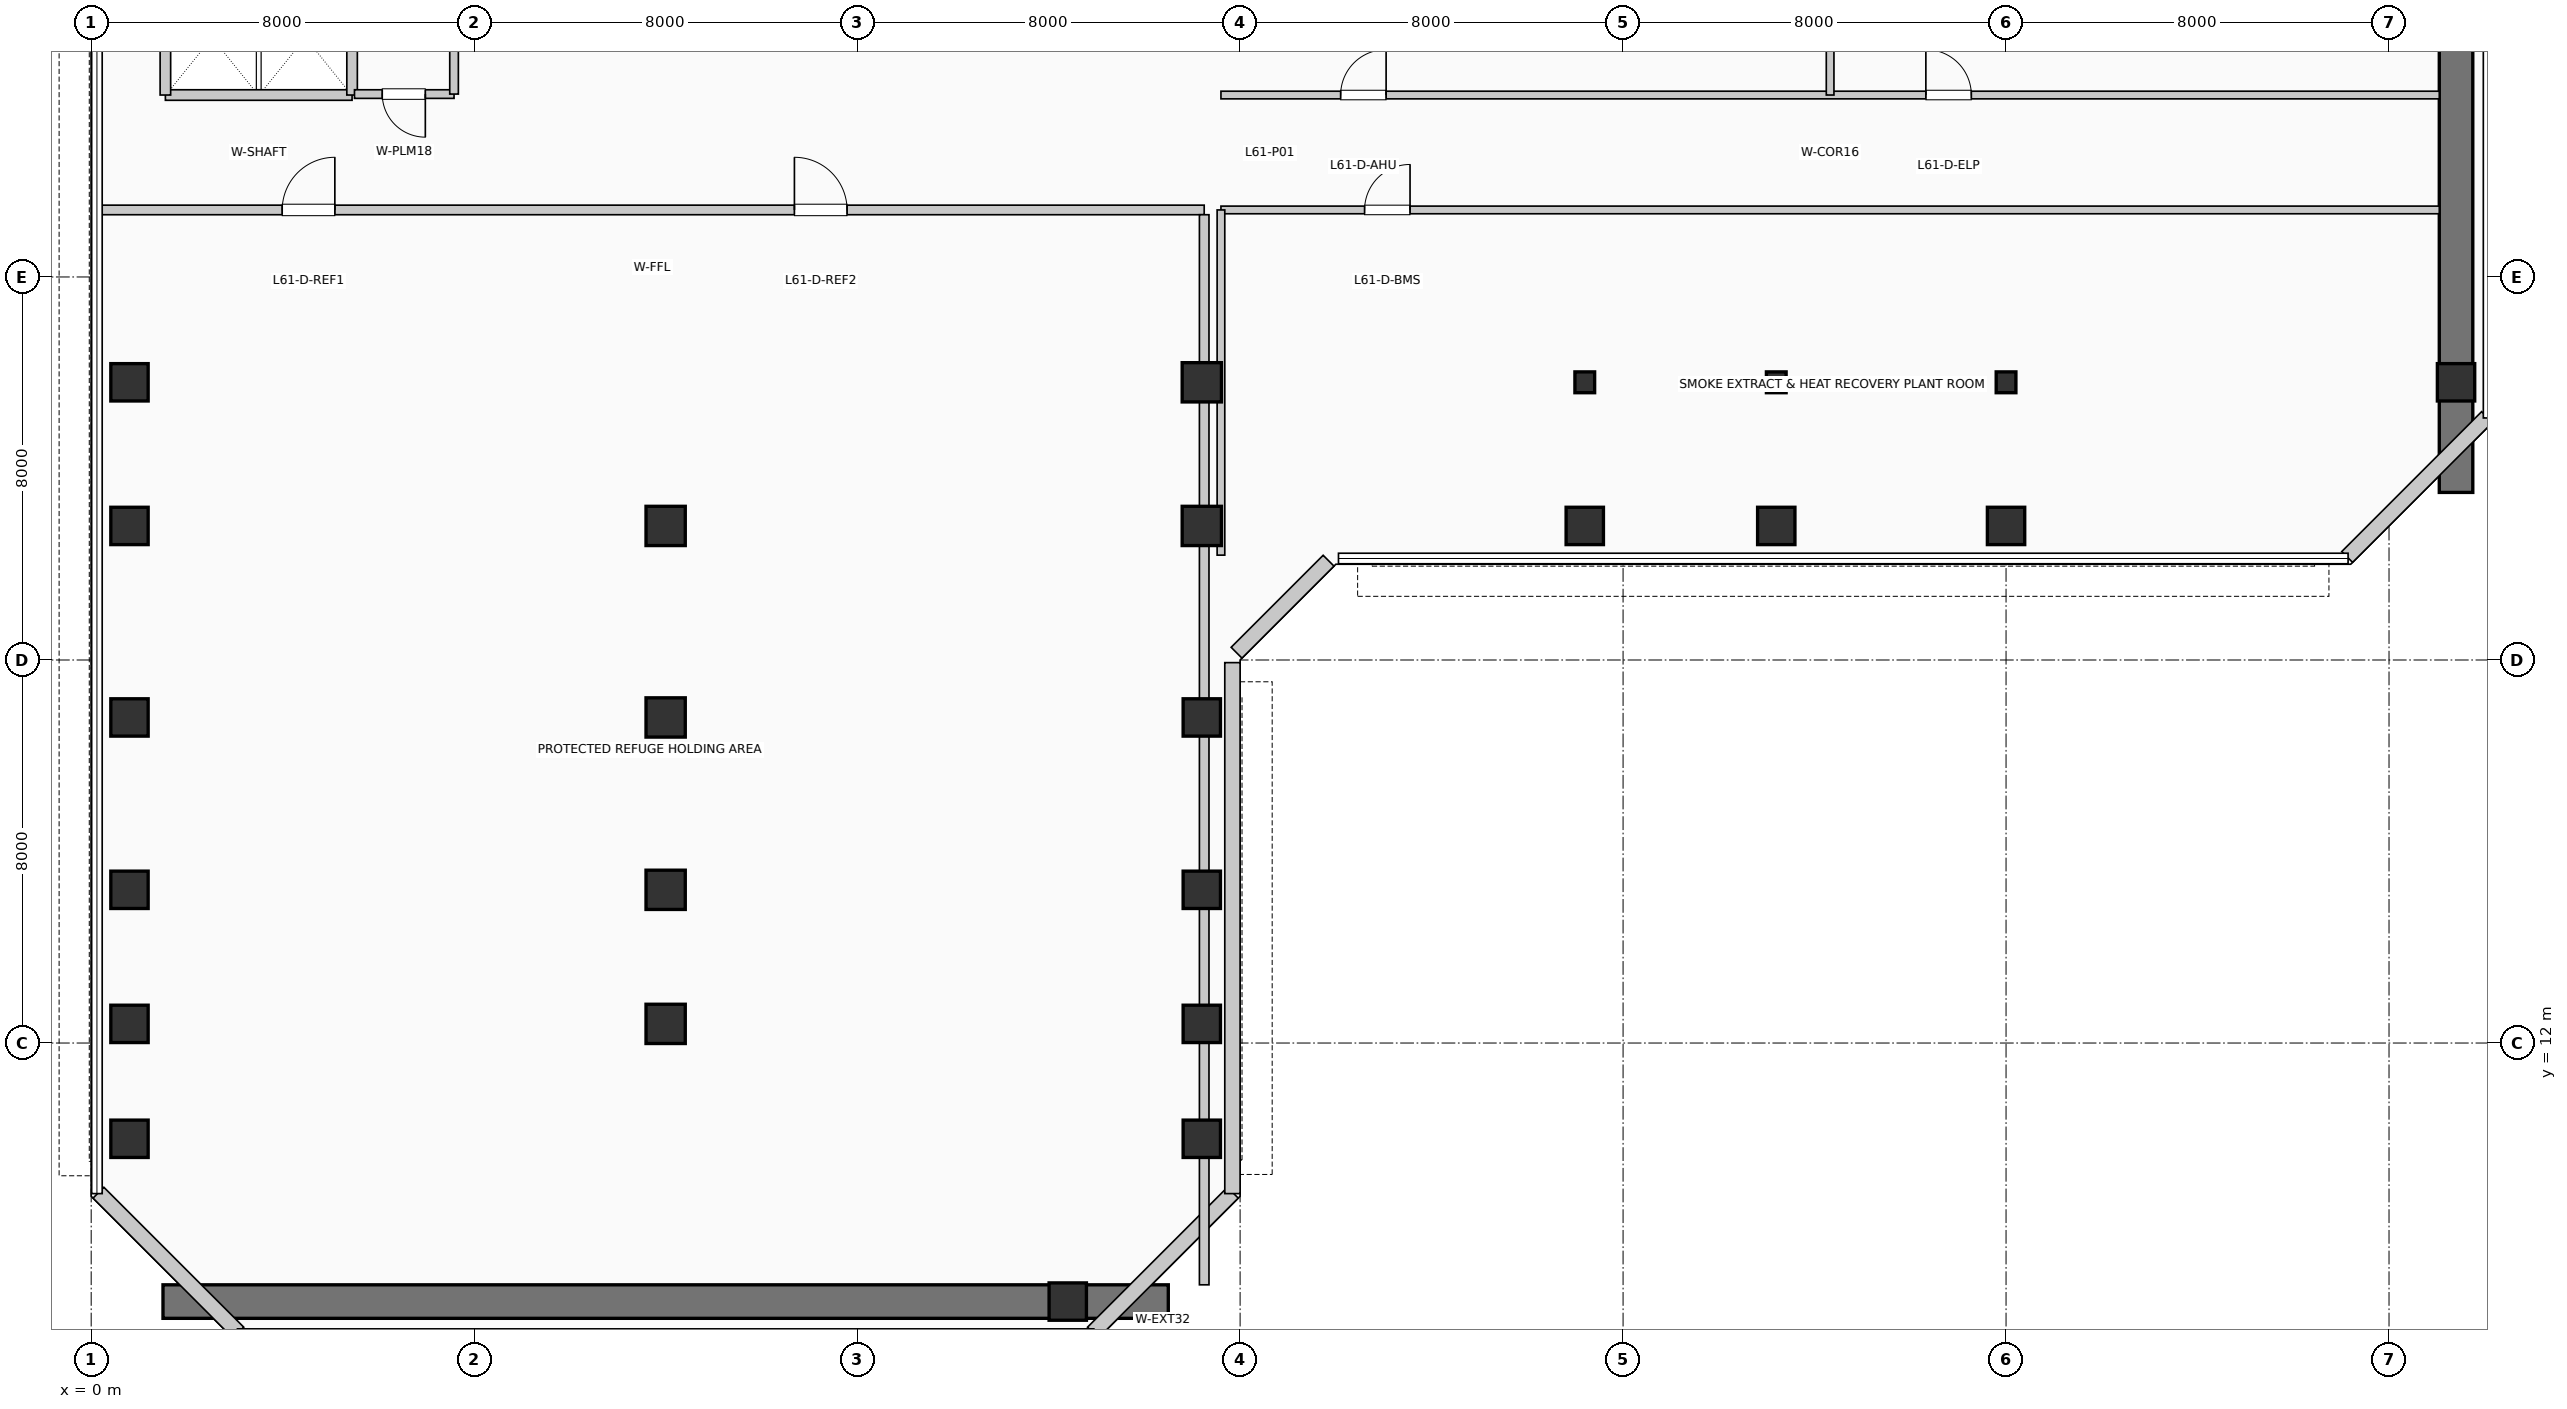
"""IFC4 building model, lengths in metres.
Left out: names, types, materials, properties, quantities, classifications, styles, units other than length and angle.
Written with IfcOpenShell. Run it as: python <this file> out.ifc"""

import sys

from ifc_helpers import new_model, si_unit, direction, frame, frame_2d, origin, origin_2d, place, context, subcontext, project, spatial, rectangle, i_section, extrude, element, fill, save


model = new_model("IFC4")
c1 = context("Model", 3, precision=1e-05, world=origin(), true_north=direction((0.0, 1.0)))
c2 = subcontext(c1, "Body", "Model", "MODEL_VIEW")
j1 = project(units=[si_unit("LENGTHUNIT", "METRE"), si_unit("PLANEANGLEUNIT", "RADIAN")], contexts=[c1])
p1 = place(None, origin())
s1 = spatial("IfcSite", under=j1, at=p1, CompositionType="ELEMENT")
p2 = place(p1, origin())
s2 = spatial("IfcBuilding", under=s1, at=p2, CompositionType="ELEMENT")
p3 = place(p2, frame((0.0, 0.0, 251.46)))
s3 = spatial("IfcBuildingStorey", under=s2, at=p3, CompositionType="ELEMENT", Elevation=251.46)
p4 = place(p3, frame((1.5, 6.6, 0.0), z_axis=(0.0, 0.0, 1.0), x_axis=(1.0, 0.0, 0.0)))
e1 = element("IfcWall", 1, at=p4, inside=s3, PredefinedType="SHEAR", context=c2, shape_type="SweptSolid", body=[
    extrude(rectangle(XDim=21.0, YDim=0.7, at=frame_2d((10.5, 0.0))), origin(), (0.0, 0.0, 1.0), 4.3),
])
p5 = place(p3, frame((49.4, 23.5, 0.0), z_axis=(0.0, 0.0, 1.0), x_axis=(0.0, 1.0, 0.0)))
e2 = element("IfcWall", 2, at=p5, inside=s3, PredefinedType="SHEAR", context=c2, shape_type="SweptSolid", body=[
    extrude(rectangle(XDim=20.9, YDim=0.7, at=frame_2d((10.45, 0.0))), origin(), (0.0, 0.0, 1.0), 4.3),
])
for number, where, z_axis, x_axis in (
    (3, (0.8, 10.0, 0.0), (0.0, 0.0, 1.0), (1.0, 0.0, 0.0)),
    (4, (0.8, 12.4, 0.0), (0.0, 0.0, 1.0), (1.0, 0.0, 0.0)),
    (5, (0.8, 15.2, 0.0), (0.0, 0.0, 1.0), (1.0, 0.0, 0.0)),
    (6, (0.8, 18.8, 0.0), (0.0, 0.0, 1.0), (1.0, 0.0, 0.0)),
    (7, (0.8, 22.8, 0.0), (0.0, 0.0, 1.0), (1.0, 0.0, 0.0)),
    (8, (0.8, 25.8, 0.0), (0.0, 0.0, 1.0), (1.0, 0.0, 0.0)),
):
    element("IfcColumn", number, at=place(p3, frame(where, z_axis=z_axis, x_axis=x_axis)), inside=s3, PredefinedType="COLUMN", context=c2, shape_type="SweptSolid", body=[
        extrude(rectangle(XDim=0.78, YDim=0.78, at=origin_2d()), origin(), (0.0, 0.0, 1.0), 4.95),
    ])
for number, where, z_axis, x_axis in (
    (9, (12.0, 12.4, 0.0), (0.0, 0.0, 1.0), (1.0, 0.0, 0.0)),
    (10, (12.0, 15.2, 0.0), (0.0, 0.0, 1.0), (1.0, 0.0, 0.0)),
    (11, (12.0, 18.8, 0.0), (0.0, 0.0, 1.0), (1.0, 0.0, 0.0)),
    (12, (12.0, 22.8, 0.0), (0.0, 0.0, 1.0), (1.0, 0.0, 0.0)),
):
    element("IfcColumn", number, at=place(p3, frame(where, z_axis=z_axis, x_axis=x_axis)), inside=s3, PredefinedType="COLUMN", context=c2, shape_type="SweptSolid", body=[
        extrude(rectangle(XDim=0.82, YDim=0.82, at=origin_2d()), origin(), (0.0, 0.0, 1.0), 4.95),
    ])
for number, where, z_axis, x_axis in (
    (13, (20.4, 6.6, 0.0), (0.0, 0.0, 1.0), (1.0, 0.0, 0.0)),
    (14, (23.2, 10.0, 0.0), (0.0, 0.0, 1.0), (1.0, 0.0, 0.0)),
    (15, (23.2, 12.4, 0.0), (0.0, 0.0, 1.0), (1.0, 0.0, 0.0)),
    (16, (23.2, 15.2, 0.0), (0.0, 0.0, 1.0), (1.0, 0.0, 0.0)),
    (17, (23.2, 18.8, 0.0), (0.0, 0.0, 1.0), (1.0, 0.0, 0.0)),
):
    element("IfcColumn", number, at=place(p3, frame(where, z_axis=z_axis, x_axis=x_axis)), inside=s3, PredefinedType="COLUMN", context=c2, shape_type="SweptSolid", body=[
        extrude(rectangle(XDim=0.78, YDim=0.78, at=origin_2d()), origin(), (0.0, 0.0, 1.0), 4.95),
    ])
for number, where, z_axis, x_axis in (
    (18, (23.2, 22.8, 0.0), (0.0, 0.0, 1.0), (1.0, 0.0, 0.0)),
    (19, (23.2, 25.8, 0.0), (0.0, 0.0, 1.0), (1.0, 0.0, 0.0)),
):
    element("IfcColumn", number, at=place(p3, frame(where, z_axis=z_axis, x_axis=x_axis)), inside=s3, PredefinedType="COLUMN", context=c2, shape_type="SweptSolid", body=[
        extrude(rectangle(XDim=0.82, YDim=0.82, at=origin_2d()), origin(), (0.0, 0.0, 1.0), 4.95),
    ])
p6 = place(p3, frame((31.2, 22.8, 0.0), z_axis=(0.0, 0.0, 1.0), x_axis=(1.0, 0.0, 0.0)))
e20 = element("IfcColumn", 20, at=p6, inside=s3, PredefinedType="COLUMN", context=c2, shape_type="SweptSolid", body=[
    extrude(rectangle(XDim=0.78, YDim=0.78, at=origin_2d()), origin(), (0.0, 0.0, 1.0), 4.95),
])
p7 = place(p3, frame((31.2, 25.8, 0.0), z_axis=(0.0, 0.0, 1.0), x_axis=(1.0, 0.0, 0.0)))
e21 = element("IfcColumn", 21, at=p7, inside=s3, PredefinedType="COLUMN", context=c2, shape_type="SweptSolid", body=[
    extrude(i_section(OverallWidth=0.412, OverallDepth=0.435, WebThickness=0.027, FlangeThickness=0.043, at=origin_2d()), origin(), (0.0, 0.0, 1.0), 4.95),
])
p8 = place(p3, frame((35.2, 22.8, 0.0), z_axis=(0.0, 0.0, 1.0), x_axis=(1.0, 0.0, 0.0)))
e22 = element("IfcColumn", 22, at=p8, inside=s3, PredefinedType="COLUMN", context=c2, shape_type="SweptSolid", body=[
    extrude(rectangle(XDim=0.78, YDim=0.78, at=origin_2d()), origin(), (0.0, 0.0, 1.0), 4.95),
])
p9 = place(p3, frame((35.2, 25.8, 0.0), z_axis=(0.0, 0.0, 1.0), x_axis=(1.0, 0.0, 0.0)))
e23 = element("IfcColumn", 23, at=p9, inside=s3, PredefinedType="COLUMN", context=c2, shape_type="SweptSolid", body=[
    extrude(i_section(OverallWidth=0.412, OverallDepth=0.435, WebThickness=0.027, FlangeThickness=0.043, at=origin_2d()), origin(), (0.0, 0.0, 1.0), 4.95),
])
p10 = place(p3, frame((40.0, 22.8, 0.0), z_axis=(0.0, 0.0, 1.0), x_axis=(1.0, 0.0, 0.0)))
e24 = element("IfcColumn", 24, at=p10, inside=s3, PredefinedType="COLUMN", context=c2, shape_type="SweptSolid", body=[
    extrude(rectangle(XDim=0.78, YDim=0.78, at=origin_2d()), origin(), (0.0, 0.0, 1.0), 4.95),
])
p11 = place(p3, frame((40.0, 25.8, 0.0), z_axis=(0.0, 0.0, 1.0), x_axis=(1.0, 0.0, 0.0)))
e25 = element("IfcColumn", 25, at=p11, inside=s3, PredefinedType="COLUMN", context=c2, shape_type="SweptSolid", body=[
    extrude(i_section(OverallWidth=0.412, OverallDepth=0.435, WebThickness=0.027, FlangeThickness=0.043, at=origin_2d()), origin(), (0.0, 0.0, 1.0), 4.95),
])
p12 = place(p3, frame((49.4, 25.8, 0.0), z_axis=(0.0, 0.0, 1.0), x_axis=(1.0, 0.0, 0.0)))
e26 = element("IfcColumn", 26, at=p12, inside=s3, PredefinedType="COLUMN", context=c2, shape_type="SweptSolid", body=[
    extrude(rectangle(XDim=0.78, YDim=0.78, at=origin_2d()), origin(), (0.0, 0.0, 1.0), 4.95),
])
p13 = place(p3, frame((20.926, 5.952, 0.0), z_axis=(0.0, 0.0, 1.0), x_axis=(0.707077242712, 0.707136318428, 0.0)))
e27 = element("IfcWall", 27, at=p13, inside=s3, PredefinedType="SOLIDWALL", context=c2, shape_type="SweptSolid", body=[
    extrude(rectangle(XDim=4.133, YDim=0.32, at=frame_2d((2.066, 0.0))), origin(), (0.0, 0.0, 1.0), 4.7),
])
p14 = place(p3, frame((23.84, 8.855, 0.0), z_axis=(0.0, 0.0, 1.0), x_axis=(0.0, 1.0, 0.0)))
e28 = element("IfcWall", 28, at=p14, inside=s3, PredefinedType="SOLIDWALL", context=c2, shape_type="SweptSolid", body=[
    extrude(rectangle(XDim=11.09, YDim=0.32, at=frame_2d((5.545, 0.0))), origin(), (0.0, 0.0, 1.0), 4.7),
])
p15 = place(p3, frame((23.926, 20.152, 0.0), z_axis=(0.0, 0.0, 1.0), x_axis=(0.707106781187, 0.707106781187, 0.0)))
e29 = element("IfcWall", 29, at=p15, inside=s3, PredefinedType="SOLIDWALL", context=c2, shape_type="SweptSolid", body=[
    extrude(rectangle(XDim=2.718, YDim=0.32, at=frame_2d((1.359, 0.0))), origin(), (0.0, 0.0, 1.0), 4.7),
])
for number, where, z_axis, x_axis in (
    (30, (47.126, 22.152, 0.0), (0.0, 0.0, 1.0), (0.707, 0.707, 0.0)),
    (31, (0.152, 8.874, 0.0), (0.0, 0.0, 1.0), (0.707, -0.707, 0.0)),
):
    element("IfcWall", number, at=place(p3, frame(where, z_axis=z_axis, x_axis=x_axis)), inside=s3, PredefinedType="SOLIDWALL", context=c2, shape_type="SweptSolid", body=[
        extrude(rectangle(XDim=4.133, YDim=0.32, at=frame_2d((2.066, 0.0))), origin(), (0.0, 0.0, 1.0), 4.7),
    ])
p16 = place(p3, frame((1.55, 31.8, 0.0), z_axis=(0.0, 0.0, 1.0), x_axis=(1.0, 0.0, 0.0)))
e32 = element("IfcWall", 32, at=p16, inside=s3, PredefinedType="PARTITIONING", context=c2, shape_type="SweptSolid", body=[
    extrude(rectangle(XDim=3.9, YDim=0.22, at=frame_2d((1.95, 0.0))), origin(), (0.0, 0.0, 1.0), 4.7),
])
for number, where, z_axis, x_axis in (
    (33, (1.55, 31.8, 0.0), (0.0, 0.0, 1.0), (0.0, 1.0, 0.0)),
    (34, (5.45, 31.8, 0.0), (0.0, 0.0, 1.0), (0.0, 1.0, 0.0)),
):
    element("IfcWall", number, at=place(p3, frame(where, z_axis=z_axis, x_axis=x_axis)), inside=s3, PredefinedType="PARTITIONING", context=c2, shape_type="SweptSolid", body=[
        extrude(rectangle(XDim=2.38, YDim=0.22, at=frame_2d((1.19, 0.0))), origin(), (0.0, 0.0, 1.0), 4.7),
    ])
p17 = place(p3, frame((5.5, 31.82, 0.0), z_axis=(0.0, 0.0, 1.0), x_axis=(1.0, 0.0, 0.0)))
e35 = element("IfcWall", 35, at=p17, inside=s3, PredefinedType="PLUMBINGWALL", context=c2, shape_type="SweptSolid", body=[
    extrude(rectangle(XDim=2.08, YDim=0.18, at=frame_2d((1.04, 0.0))), origin(), (0.0, 0.0, 1.0), 4.7),
])
p18 = place(p17, frame((1.48, 0.0, 0.0), z_axis=(0.0, 0.0, 1.0), x_axis=(-1.0, 0.0, 0.0)))
e36 = element("IfcOpeningElement", 36, at=p18, cuts=e35, PredefinedType="OPENING", context=c2, shape_type="SweptSolid", body=[
    extrude(rectangle(XDim=0.9, YDim=2.1, at=frame_2d((0.45, 1.05))), frame((0.0, 0.1, 0.0), z_axis=(0.0, -1.0, 0.0), x_axis=(1.0, 0.0, 0.0)), (0.0, 0.0, 1.0), 0.2),
])
p19 = place(p3, frame((7.58, 31.82, 0.0), z_axis=(0.0, 0.0, 1.0), x_axis=(0.0, 1.0, 0.0)))
e37 = element("IfcWall", 37, at=p19, inside=s3, PredefinedType="PLUMBINGWALL", context=c2, shape_type="SweptSolid", body=[
    extrude(rectangle(XDim=2.36, YDim=0.18, at=frame_2d((1.18, 0.0))), origin(), (0.0, 0.0, 1.0), 4.7),
])
p20 = place(p3, frame((0.19, 29.4, 0.0), z_axis=(0.0, 0.0, 1.0), x_axis=(1.0, 0.0, 0.0)))
e38 = element("IfcWall", 38, at=p20, inside=s3, PredefinedType="PARTITIONING", context=c2, shape_type="SweptSolid", body=[
    extrude(rectangle(XDim=23.06, YDim=0.2, at=frame_2d((11.53, 0.0))), origin(), (0.0, 0.0, 1.0), 4.355),
])
p21 = place(p20, frame((3.8, 0.0, 0.0)))
e39 = element("IfcOpeningElement", 39, at=p21, cuts=e38, PredefinedType="OPENING", context=c2, shape_type="SweptSolid", body=[
    extrude(rectangle(XDim=1.1, YDim=2.15, at=frame_2d((0.55, 1.075))), frame((0.0, 0.11, 0.0), z_axis=(0.0, -1.0, 0.0), x_axis=(1.0, 0.0, 0.0)), (0.0, 0.0, 1.0), 0.22),
])
p22 = place(p20, frame((14.5, 0.0, 0.0)))
e40 = element("IfcOpeningElement", 40, at=p22, cuts=e38, PredefinedType="OPENING", context=c2, shape_type="SweptSolid", body=[
    extrude(rectangle(XDim=1.1, YDim=2.15, at=frame_2d((0.55, 1.075))), frame((0.0, 0.11, 0.0), z_axis=(0.0, -1.0, 0.0), x_axis=(1.0, 0.0, 0.0)), (0.0, 0.0, 1.0), 0.22),
])
p23 = place(p3, frame((23.25, 6.95, 0.0), z_axis=(0.0, 0.0, 1.0), x_axis=(0.0, 1.0, 0.0)))
e41 = element("IfcWall", 41, at=p23, inside=s3, PredefinedType="PARTITIONING", context=c2, shape_type="SweptSolid", body=[
    extrude(rectangle(XDim=22.35, YDim=0.2, at=frame_2d((11.175, 0.0))), origin(), (0.0, 0.0, 1.0), 4.085),
])
p24 = place(p3, frame((23.6, 31.8, 0.0), z_axis=(0.0, 0.0, 1.0), x_axis=(1.0, 0.0, 0.0)))
e42 = element("IfcWall", 42, at=p24, inside=s3, PredefinedType="PARTITIONING", context=c2, shape_type="SweptSolid", body=[
    extrude(rectangle(XDim=25.45, YDim=0.16, at=frame_2d((12.725, 0.0))), origin(), (0.0, 0.0, 1.0), 4.7),
])
p25 = place(p24, frame((2.5, 0.0, 0.0)))
e43 = element("IfcOpeningElement", 43, at=p25, cuts=e42, PredefinedType="OPENING", context=c2, shape_type="SweptSolid", body=[
    extrude(rectangle(XDim=0.95, YDim=2.1, at=frame_2d((0.475, 1.05))), frame((0.0, 0.09, 0.0), z_axis=(0.0, -1.0, 0.0), x_axis=(1.0, 0.0, 0.0)), (0.0, 0.0, 1.0), 0.18),
])
p26 = place(p24, frame((14.725, 0.0, 0.0)))
e44 = element("IfcOpeningElement", 44, at=p26, cuts=e42, PredefinedType="OPENING", context=c2, shape_type="SweptSolid", body=[
    extrude(rectangle(XDim=0.95, YDim=2.1, at=frame_2d((0.475, 1.05))), frame((0.0, 0.09, 0.0), z_axis=(0.0, -1.0, 0.0), x_axis=(1.0, 0.0, 0.0)), (0.0, 0.0, 1.0), 0.18),
])
p27 = place(p3, frame((36.325, 31.8, 0.0), z_axis=(0.0, 0.0, 1.0), x_axis=(0.0, 1.0, 0.0)))
e45 = element("IfcWall", 45, at=p27, inside=s3, PredefinedType="PARTITIONING", context=c2, shape_type="SweptSolid", body=[
    extrude(rectangle(XDim=14.01, YDim=0.16, at=frame_2d((7.005, 0.0))), origin(), (0.0, 0.0, 1.0), 4.7),
])
p28 = place(p3, frame((23.6, 29.4, 0.0), z_axis=(0.0, 0.0, 1.0), x_axis=(1.0, 0.0, 0.0)))
e46 = element("IfcWall", 46, at=p28, inside=s3, PredefinedType="PARTITIONING", context=c2, shape_type="SweptSolid", body=[
    extrude(rectangle(XDim=25.45, YDim=0.16, at=frame_2d((12.725, 0.0))), origin(), (0.0, 0.0, 1.0), 4.355),
])
p29 = place(p28, frame((3.0, 0.0, 0.0)))
e47 = element("IfcOpeningElement", 47, at=p29, cuts=e46, PredefinedType="OPENING", context=c2, shape_type="SweptSolid", body=[
    extrude(rectangle(XDim=0.95, YDim=2.1, at=frame_2d((0.475, 1.05))), frame((0.0, 0.09, 0.0), z_axis=(0.0, -1.0, 0.0), x_axis=(1.0, 0.0, 0.0)), (0.0, 0.0, 1.0), 0.18),
])
p30 = place(p3, frame((23.6, 22.19, 0.0), z_axis=(0.0, 0.0, 1.0), x_axis=(0.0, 1.0, 0.0)))
e48 = element("IfcWall", 48, at=p30, inside=s3, PredefinedType="PARTITIONING", context=c2, shape_type="SweptSolid", body=[
    extrude(rectangle(XDim=7.21, YDim=0.16, at=frame_2d((3.605, 0.0))), origin(), (0.0, 0.0, 1.0), 4.085),
])
p31 = place(p18, origin())
e49 = element("IfcDoor", 49, at=p31, inside=s3, OperationType="SINGLE_SWING_RIGHT", PredefinedType="DOOR", context=c2, shape_type="SweptSolid", body=[
    extrude(rectangle(XDim=0.9, YDim=2.1, at=frame_2d((0.45, 1.05))), frame((0.0, 0.025, 0.0), z_axis=(0.0, -1.0, 0.0), x_axis=(1.0, 0.0, 0.0)), (0.0, 0.0, 1.0), 0.05),
])
fill(e36, e49)
p32 = place(p21, origin())
e50 = element("IfcDoor", 50, at=p32, inside=s3, OperationType="SINGLE_SWING_RIGHT", PredefinedType="DOOR", context=c2, shape_type="SweptSolid", body=[
    extrude(rectangle(XDim=1.1, YDim=2.15, at=frame_2d((0.55, 1.075))), frame((0.0, 0.025, 0.0), z_axis=(0.0, -1.0, 0.0), x_axis=(1.0, 0.0, 0.0)), (0.0, 0.0, 1.0), 0.05),
])
fill(e39, e50)
p33 = place(p22, origin())
e51 = element("IfcDoor", 51, at=p33, inside=s3, OperationType="SINGLE_SWING_LEFT", PredefinedType="DOOR", context=c2, shape_type="SweptSolid", body=[
    extrude(rectangle(XDim=1.1, YDim=2.15, at=frame_2d((0.55, 1.075))), frame((0.0, 0.025, 0.0), z_axis=(0.0, -1.0, 0.0), x_axis=(1.0, 0.0, 0.0)), (0.0, 0.0, 1.0), 0.05),
])
fill(e40, e51)
p34 = place(p25, origin())
e52 = element("IfcDoor", 52, at=p34, inside=s3, OperationType="SINGLE_SWING_RIGHT", PredefinedType="DOOR", context=c2, shape_type="SweptSolid", body=[
    extrude(rectangle(XDim=0.95, YDim=2.1, at=frame_2d((0.475, 1.05))), frame((0.0, 0.025, 0.0), z_axis=(0.0, -1.0, 0.0), x_axis=(1.0, 0.0, 0.0)), (0.0, 0.0, 1.0), 0.05),
])
fill(e43, e52)
p35 = place(p26, origin())
e53 = element("IfcDoor", 53, at=p35, inside=s3, OperationType="SINGLE_SWING_LEFT", PredefinedType="DOOR", context=c2, shape_type="SweptSolid", body=[
    extrude(rectangle(XDim=0.95, YDim=2.1, at=frame_2d((0.475, 1.05))), frame((0.0, 0.025, 0.0), z_axis=(0.0, -1.0, 0.0), x_axis=(1.0, 0.0, 0.0)), (0.0, 0.0, 1.0), 0.05),
])
fill(e44, e53)
p36 = place(p29, origin())
e54 = element("IfcDoor", 54, at=p36, inside=s3, OperationType="SINGLE_SWING_RIGHT", PredefinedType="DOOR", context=c2, shape_type="SweptSolid", body=[
    extrude(rectangle(XDim=0.95, YDim=2.1, at=frame_2d((0.475, 1.05))), frame((0.0, 0.025, 0.0), z_axis=(0.0, -1.0, 0.0), x_axis=(1.0, 0.0, 0.0)), (0.0, 0.0, 1.0), 0.05),
])
fill(e47, e54)
save(model, sys.argv[1])
